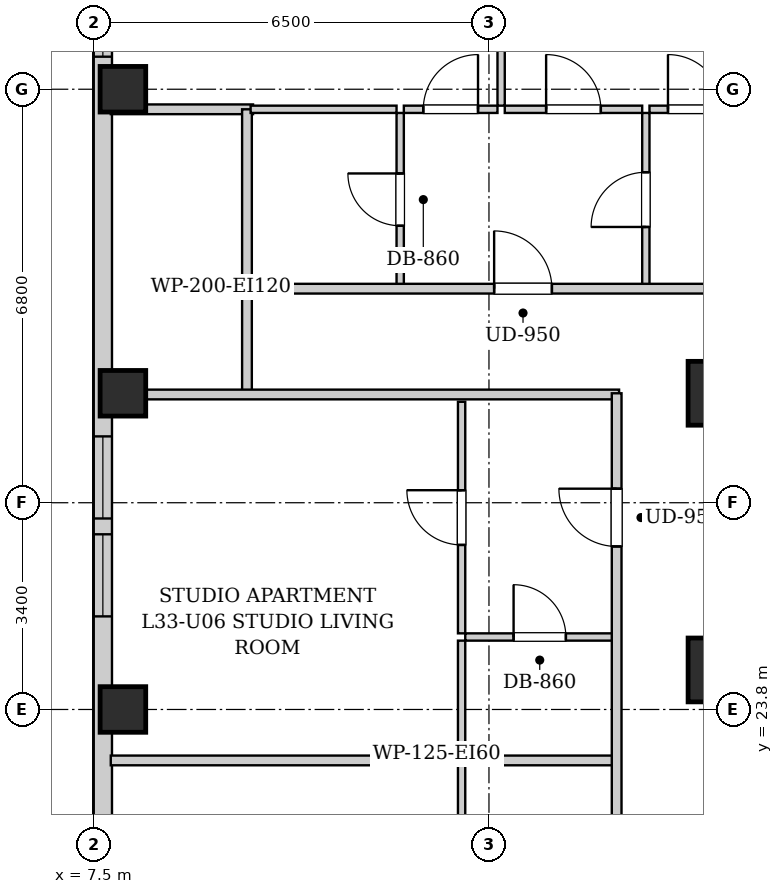
"""IFC4 building model, lengths in metres.
Left out: names, types, materials, properties, quantities, classifications, styles, units other than length and angle.
Written with IfcOpenShell. Run it as: python <this file> out.ifc"""

import sys

from ifc_helpers import new_model, si_unit, direction, frame, frame_2d, origin, origin_2d, place, context, subcontext, project, spatial, rectangle, extrude, element, fill, save


model = new_model("IFC4")
c1 = context("Model", 3, precision=1e-05, world=origin(), true_north=direction((0.0, 1.0)))
c2 = subcontext(c1, "Body", "Model", "MODEL_VIEW")
j1 = project(units=[si_unit("LENGTHUNIT", "METRE"), si_unit("PLANEANGLEUNIT", "RADIAN")], contexts=[c1])
p1 = place(None, origin())
s1 = spatial("IfcSite", under=j1, at=p1, CompositionType="ELEMENT")
p2 = place(p1, origin())
s2 = spatial("IfcBuilding", under=s1, at=p2, CompositionType="ELEMENT")
p3 = place(p2, frame((0.0, 0.0, 116.7)))
s3 = spatial("IfcBuildingStorey", under=s2, at=p3, CompositionType="ELEMENT", Elevation=116.7)
for number, where, z_axis, x_axis in (
    (1, (7.98, 23.8, 0.0), (0.0, 0.0, 1.0), (1.0, 0.0, 0.0)),
    (2, (7.98, 29.0, 0.0), (0.0, 0.0, 1.0), (1.0, 0.0, 0.0)),
    (3, (7.98, 34.0, 0.0), (0.0, 0.0, 1.0), (1.0, 0.0, 0.0)),
):
    element("IfcColumn", number, at=place(p3, frame(where, z_axis=z_axis, x_axis=x_axis)), inside=s3, PredefinedType="COLUMN", context=c2, shape_type="SweptSolid", body=[
        extrude(rectangle(XDim=0.75, YDim=0.75, at=origin_2d()), origin(), (0.0, 0.0, 1.0), 3.2),
    ])
for number, where, z_axis, x_axis in (
    (4, (17.8, 29.0, 0.0), (0.0, 0.0, 1.0), (1.0, 0.0, 0.0)),
    (5, (17.8, 24.45, 0.0), (0.0, 0.0, 1.0), (1.0, 0.0, 0.0)),
):
    element("IfcColumn", number, at=place(p3, frame(where, z_axis=z_axis, x_axis=x_axis)), inside=s3, PredefinedType="COLUMN", context=c2, shape_type="SweptSolid", body=[
        extrude(rectangle(XDim=1.05, YDim=1.05, at=origin_2d()), origin(), (0.0, 0.0, 1.0), 3.2),
    ])
p4 = place(p3, frame((7.65, 2.5, 0.0), z_axis=(0.0, 0.0, 1.0), x_axis=(0.0, 1.0, 0.0)))
e6 = element("IfcWall", 6, at=p4, inside=s3, PredefinedType="SOLIDWALL", context=c2, shape_type="SweptSolid", body=[
    extrude(rectangle(XDim=38.3, YDim=0.3, at=frame_2d((19.15, 0.0))), origin(), (0.0, 0.0, 1.0), 2.88),
])
p5 = place(p4, frame((3.38, 0.0, 0.55)))
e7 = element("IfcOpeningElement", 7, at=p5, cuts=e6, PredefinedType="OPENING", context=c2, shape_type="SweptSolid", body=[
    extrude(rectangle(XDim=1.35, YDim=1.2, at=frame_2d((0.675, 0.6))), frame((0.0, 0.16, 0.0), z_axis=(0.0, -1.0, 0.0), x_axis=(1.0, 0.0, 0.0)), (0.0, 0.0, 1.0), 0.32),
])
p6 = place(p4, frame((1.135, 0.0, 0.55)))
e8 = element("IfcOpeningElement", 8, at=p6, cuts=e6, PredefinedType="OPENING", context=c2, shape_type="SweptSolid", body=[
    extrude(rectangle(XDim=1.35, YDim=1.2, at=frame_2d((0.675, 0.6))), frame((0.0, 0.16, 0.0), z_axis=(0.0, -1.0, 0.0), x_axis=(1.0, 0.0, 0.0)), (0.0, 0.0, 1.0), 0.32),
])
p7 = place(p4, frame((33.946, 0.0, 0.55)))
e9 = element("IfcOpeningElement", 9, at=p7, cuts=e6, PredefinedType="OPENING", context=c2, shape_type="SweptSolid", body=[
    extrude(rectangle(XDim=1.35, YDim=1.2, at=frame_2d((0.675, 0.6))), frame((0.0, 0.16, 0.0), z_axis=(0.0, -1.0, 0.0), x_axis=(1.0, 0.0, 0.0)), (0.0, 0.0, 1.0), 0.32),
])
p8 = place(p4, frame((32.035, 0.0, 0.55)))
e10 = element("IfcOpeningElement", 10, at=p8, cuts=e6, PredefinedType="OPENING", context=c2, shape_type="SweptSolid", body=[
    extrude(rectangle(XDim=1.35, YDim=1.2, at=frame_2d((0.675, 0.6))), frame((0.0, 0.16, 0.0), z_axis=(0.0, -1.0, 0.0), x_axis=(1.0, 0.0, 0.0)), (0.0, 0.0, 1.0), 0.32),
])
p9 = place(p4, frame((15.65, 0.0, 0.55)))
e11 = element("IfcOpeningElement", 11, at=p9, cuts=e6, PredefinedType="OPENING", context=c2, shape_type="SweptSolid", body=[
    extrude(rectangle(XDim=1.35, YDim=1.2, at=frame_2d((0.675, 0.6))), frame((0.0, 0.16, 0.0), z_axis=(0.0, -1.0, 0.0), x_axis=(1.0, 0.0, 0.0)), (0.0, 0.0, 1.0), 0.32),
])
p10 = place(p4, frame((13.035, 0.0, 0.55)))
e12 = element("IfcOpeningElement", 12, at=p10, cuts=e6, PredefinedType="OPENING", context=c2, shape_type="SweptSolid", body=[
    extrude(rectangle(XDim=1.35, YDim=1.2, at=frame_2d((0.675, 0.6))), frame((0.0, 0.16, 0.0), z_axis=(0.0, -1.0, 0.0), x_axis=(1.0, 0.0, 0.0)), (0.0, 0.0, 1.0), 0.32),
])
p11 = place(p4, frame((22.831, 0.0, 0.55)))
e13 = element("IfcOpeningElement", 13, at=p11, cuts=e6, PredefinedType="OPENING", context=c2, shape_type="SweptSolid", body=[
    extrude(rectangle(XDim=1.35, YDim=1.2, at=frame_2d((0.675, 0.6))), frame((0.0, 0.16, 0.0), z_axis=(0.0, -1.0, 0.0), x_axis=(1.0, 0.0, 0.0)), (0.0, 0.0, 1.0), 0.32),
])
p12 = place(p4, frame((24.441, 0.0, 0.55)))
e14 = element("IfcOpeningElement", 14, at=p12, cuts=e6, PredefinedType="OPENING", context=c2, shape_type="SweptSolid", body=[
    extrude(rectangle(XDim=1.35, YDim=1.2, at=frame_2d((0.675, 0.6))), frame((0.0, 0.16, 0.0), z_axis=(0.0, -1.0, 0.0), x_axis=(1.0, 0.0, 0.0)), (0.0, 0.0, 1.0), 0.32),
])
p13 = place(p3, frame((10.02, 28.98, 0.0), z_axis=(0.0, 0.0, 1.0), x_axis=(0.0, 1.0, 0.0)))
e15 = element("IfcWall", 15, at=p13, inside=s3, PredefinedType="PARTITIONING", context=c2, shape_type="SweptSolid", body=[
    extrude(rectangle(XDim=1.74, YDim=0.16, at=frame_2d((0.87, 0.0))), origin(), (0.0, 0.0, 1.0), 2.88),
])
p14 = place(p3, frame((7.78, 28.98, 0.0), z_axis=(0.0, 0.0, 1.0), x_axis=(1.0, 0.0, 0.0)))
e16 = element("IfcWall", 16, at=p14, inside=s3, PredefinedType="PARTITIONING", context=c2, shape_type="SweptSolid", body=[
    extrude(rectangle(XDim=8.36, YDim=0.16, at=frame_2d((4.18, 0.0))), origin(), (0.0, 0.0, 1.0), 2.253),
])
p15 = place(p3, frame((7.78, 33.67, 0.0), z_axis=(0.0, 0.0, 1.0), x_axis=(1.0, 0.0, 0.0)))
e17 = element("IfcWall", 17, at=p15, inside=s3, PredefinedType="PARTITIONING", context=c2, shape_type="SweptSolid", body=[
    extrude(rectangle(XDim=2.34, YDim=0.16, at=frame_2d((1.17, 0.0))), origin(), (0.0, 0.0, 1.0), 2.88),
])
p16 = place(p3, frame((10.02, 30.76, 0.0), z_axis=(0.0, 0.0, 1.0), x_axis=(0.0, 1.0, 0.0)))
e18 = element("IfcWall", 18, at=p16, inside=s3, PredefinedType="PARTITIONING", context=c2, shape_type="SweptSolid", body=[
    extrude(rectangle(XDim=2.91, YDim=0.16, at=frame_2d((1.455, 0.0))), origin(), (0.0, 0.0, 1.0), 2.88),
])
p17 = place(p3, frame((12.54, 30.76, 0.0), z_axis=(0.0, 0.0, 1.0), x_axis=(0.0, 1.0, 0.0)))
e19 = element("IfcWall", 19, at=p17, inside=s3, PredefinedType="PARTITIONING", context=c2, shape_type="SweptSolid", body=[
    extrude(rectangle(XDim=2.85, YDim=0.12, at=frame_2d((1.425, 0.0))), origin(), (0.0, 0.0, 1.0), 2.88),
])
p18 = place(p17, frame((0.995, 0.0, 0.0)))
e20 = element("IfcOpeningElement", 20, at=p18, cuts=e19, PredefinedType="OPENING", context=c2, shape_type="SweptSolid", body=[
    extrude(rectangle(XDim=0.86, YDim=2.05, at=frame_2d((0.43, 1.025))), frame((0.0, 0.07, 0.0), z_axis=(0.0, -1.0, 0.0), x_axis=(1.0, 0.0, 0.0)), (0.0, 0.0, 1.0), 0.14),
])
p19 = place(p3, frame((10.08, 33.67, 0.0), z_axis=(0.0, 0.0, 1.0), x_axis=(1.0, 0.0, 0.0)))
e21 = element("IfcWall", 21, at=p19, inside=s3, PredefinedType="PARTITIONING", context=c2, shape_type="SweptSolid", body=[
    extrude(rectangle(XDim=2.4, YDim=0.12, at=frame_2d((1.2, 0.0))), origin(), (0.0, 0.0, 1.0), 2.88),
])
p20 = place(p3, frame((16.58, 30.76, 0.0), z_axis=(0.0, 0.0, 1.0), x_axis=(0.0, 1.0, 0.0)))
e22 = element("IfcWall", 22, at=p20, inside=s3, PredefinedType="PARTITIONING", context=c2, shape_type="SweptSolid", body=[
    extrude(rectangle(XDim=2.85, YDim=0.12, at=frame_2d((1.425, 0.0))), origin(), (0.0, 0.0, 1.0), 2.88),
])
p21 = place(p20, frame((0.975, 0.0, 0.0)))
e23 = element("IfcOpeningElement", 23, at=p21, cuts=e22, PredefinedType="OPENING", context=c2, shape_type="SweptSolid", body=[
    extrude(rectangle(XDim=0.9, YDim=2.05, at=frame_2d((0.45, 1.025))), frame((0.0, 0.07, 0.0), z_axis=(0.0, -1.0, 0.0), x_axis=(1.0, 0.0, 0.0)), (0.0, 0.0, 1.0), 0.14),
])
p22 = place(p3, frame((12.6, 33.67, 0.0), z_axis=(0.0, 0.0, 1.0), x_axis=(1.0, 0.0, 0.0)))
e24 = element("IfcWall", 24, at=p22, inside=s3, PredefinedType="PARTITIONING", context=c2, shape_type="SweptSolid", body=[
    extrude(rectangle(XDim=1.54, YDim=0.12, at=frame_2d((0.77, 0.0))), origin(), (0.0, 0.0, 1.0), 2.88),
])
p23 = place(p22, frame((0.32, 0.0, 0.0)))
e25 = element("IfcOpeningElement", 25, at=p23, cuts=e24, PredefinedType="OPENING", context=c2, shape_type="SweptSolid", body=[
    extrude(rectangle(XDim=0.9, YDim=2.05, at=frame_2d((0.45, 1.025))), frame((0.0, 0.07, 0.0), z_axis=(0.0, -1.0, 0.0), x_axis=(1.0, 0.0, 0.0)), (0.0, 0.0, 1.0), 0.14),
])
p24 = place(p3, frame((14.26, 33.67, 0.0), z_axis=(0.0, 0.0, 1.0), x_axis=(1.0, 0.0, 0.0)))
e26 = element("IfcWall", 26, at=p24, inside=s3, PredefinedType="PARTITIONING", context=c2, shape_type="SweptSolid", body=[
    extrude(rectangle(XDim=2.26, YDim=0.12, at=frame_2d((1.13, 0.0))), origin(), (0.0, 0.0, 1.0), 2.88),
])
p25 = place(p24, frame((0.68, 0.0, 0.0)))
e27 = element("IfcOpeningElement", 27, at=p25, cuts=e26, PredefinedType="OPENING", context=c2, shape_type="SweptSolid", body=[
    extrude(rectangle(XDim=0.9, YDim=2.05, at=frame_2d((0.45, 1.025))), frame((0.0, 0.07, 0.0), z_axis=(0.0, -1.0, 0.0), x_axis=(1.0, 0.0, 0.0)), (0.0, 0.0, 1.0), 0.14),
])
p26 = place(p3, frame((16.64, 33.67, 0.0), z_axis=(0.0, 0.0, 1.0), x_axis=(1.0, 0.0, 0.0)))
e28 = element("IfcWall", 28, at=p26, inside=s3, PredefinedType="PARTITIONING", context=c2, shape_type="SweptSolid", body=[
    extrude(rectangle(XDim=1.508, YDim=0.12, at=frame_2d((0.754, 0.0))), origin(), (0.0, 0.0, 1.0), 2.88),
])
p27 = place(p26, frame((0.304, 0.0, 0.0)))
e29 = element("IfcOpeningElement", 29, at=p27, cuts=e28, PredefinedType="OPENING", context=c2, shape_type="SweptSolid", body=[
    extrude(rectangle(XDim=0.9, YDim=2.05, at=frame_2d((0.45, 1.025))), frame((0.0, 0.07, 0.0), z_axis=(0.0, -1.0, 0.0), x_axis=(1.0, 0.0, 0.0)), (0.0, 0.0, 1.0), 0.14),
])
p28 = place(p3, frame((14.2, 33.73, 0.0), z_axis=(0.0, 0.0, 1.0), x_axis=(0.0, 1.0, 0.0)))
e30 = element("IfcWall", 30, at=p28, inside=s3, PredefinedType="PARTITIONING", context=c2, shape_type="SweptSolid", body=[
    extrude(rectangle(XDim=9.29, YDim=0.12, at=frame_2d((4.645, 0.0))), origin(), (0.0, 0.0, 1.0), 2.88),
])
p29 = place(p28, frame((4.18, 0.0, 0.0)))
e31 = element("IfcOpeningElement", 31, at=p29, cuts=e30, PredefinedType="OPENING", context=c2, shape_type="SweptSolid", body=[
    extrude(rectangle(XDim=0.9, YDim=2.05, at=frame_2d((0.45, 1.025))), frame((0.0, 0.07, 0.0), z_axis=(0.0, -1.0, 0.0), x_axis=(1.0, 0.0, 0.0)), (0.0, 0.0, 1.0), 0.14),
])
p30 = place(p3, frame((7.78, 22.962, 0.0), z_axis=(0.0, 0.0, 1.0), x_axis=(1.0, 0.0, 0.0)))
e32 = element("IfcWall", 32, at=p30, inside=s3, PredefinedType="PARTITIONING", context=c2, shape_type="SweptSolid", body=[
    extrude(rectangle(XDim=8.28, YDim=0.16, at=frame_2d((4.14, 0.0))), origin(), (0.0, 0.0, 1.0), 2.88),
])
p31 = place(p3, frame((13.55, 17.489, 0.0), z_axis=(0.0, 0.0, 1.0), x_axis=(0.0, 1.0, 0.0)))
e33 = element("IfcWall", 33, at=p31, inside=s3, PredefinedType="PARTITIONING", context=c2, shape_type="SweptSolid", body=[
    extrude(rectangle(XDim=5.433, YDim=0.12, at=frame_2d((2.717, 0.0))), origin(), (0.0, 0.0, 1.0), 2.88),
])
p32 = place(p31, frame((2.266, 0.0, 0.0)))
e34 = element("IfcOpeningElement", 34, at=p32, cuts=e33, PredefinedType="OPENING", context=c2, shape_type="SweptSolid", body=[
    extrude(rectangle(XDim=0.9, YDim=2.05, at=frame_2d((0.45, 1.025))), frame((0.0, 0.07, 0.0), z_axis=(0.0, -1.0, 0.0), x_axis=(1.0, 0.0, 0.0)), (0.0, 0.0, 1.0), 0.14),
])
p33 = place(p3, frame((13.61, 24.992, 0.0), z_axis=(0.0, 0.0, 1.0), x_axis=(1.0, 0.0, 0.0)))
e35 = element("IfcWall", 35, at=p33, inside=s3, PredefinedType="PARTITIONING", context=c2, shape_type="SweptSolid", body=[
    extrude(rectangle(XDim=2.45, YDim=0.12, at=frame_2d((1.225, 0.0))), origin(), (0.0, 0.0, 1.0), 2.88),
])
p34 = place(p33, frame((0.795, 0.0, 0.0)))
e36 = element("IfcOpeningElement", 36, at=p34, cuts=e35, PredefinedType="OPENING", context=c2, shape_type="SweptSolid", body=[
    extrude(rectangle(XDim=0.86, YDim=2.05, at=frame_2d((0.43, 1.025))), frame((0.0, 0.07, 0.0), z_axis=(0.0, -1.0, 0.0), x_axis=(1.0, 0.0, 0.0)), (0.0, 0.0, 1.0), 0.14),
])
p35 = place(p3, frame((13.55, 23.082, 0.0), z_axis=(0.0, 0.0, 1.0), x_axis=(0.0, 1.0, 0.0)))
e37 = element("IfcWall", 37, at=p35, inside=s3, PredefinedType="PARTITIONING", context=c2, shape_type="SweptSolid", body=[
    extrude(rectangle(XDim=1.85, YDim=0.12, at=frame_2d((0.925, 0.0))), origin(), (0.0, 0.0, 1.0), 2.88),
])
p36 = place(p3, frame((13.55, 25.052, 0.0), z_axis=(0.0, 0.0, 1.0), x_axis=(0.0, 1.0, 0.0)))
e38 = element("IfcWall", 38, at=p36, inside=s3, PredefinedType="PARTITIONING", context=c2, shape_type="SweptSolid", body=[
    extrude(rectangle(XDim=3.808, YDim=0.12, at=frame_2d((1.904, 0.0))), origin(), (0.0, 0.0, 1.0), 2.88),
])
p37 = place(p36, frame((1.454, 0.0, 0.0)))
e39 = element("IfcOpeningElement", 39, at=p37, cuts=e38, PredefinedType="OPENING", context=c2, shape_type="SweptSolid", body=[
    extrude(rectangle(XDim=0.9, YDim=2.05, at=frame_2d((0.45, 1.025))), frame((0.0, 0.07, 0.0), z_axis=(0.0, -1.0, 0.0), x_axis=(1.0, 0.0, 0.0)), (0.0, 0.0, 1.0), 0.14),
])
p38 = place(p3, frame((10.05, 30.72, 0.0), z_axis=(0.0, 0.0, 1.0), x_axis=(1.0, 0.0, 0.0)))
e40 = element("IfcWall", 40, at=p38, inside=s3, PredefinedType="PARTITIONING", context=c2, shape_type="SweptSolid", body=[
    extrude(rectangle(XDim=30.8, YDim=0.16, at=frame_2d((15.4, 0.0))), origin(), (0.0, 0.0, 1.0), 2.88),
])
p39 = place(p38, frame((4.035, 0.0, 0.0)))
e41 = element("IfcOpeningElement", 41, at=p39, cuts=e40, PredefinedType="OPENING", context=c2, shape_type="SweptSolid", body=[
    extrude(rectangle(XDim=0.95, YDim=2.1, at=frame_2d((0.475, 1.05))), frame((0.0, 0.09, 0.0), z_axis=(0.0, -1.0, 0.0), x_axis=(1.0, 0.0, 0.0)), (0.0, 0.0, 1.0), 0.18),
])
p40 = place(p38, frame((25.11, 0.0, 0.0)))
e42 = element("IfcOpeningElement", 42, at=p40, cuts=e40, PredefinedType="OPENING", context=c2, shape_type="SweptSolid", body=[
    extrude(rectangle(XDim=0.95, YDim=2.1, at=frame_2d((0.475, 1.05))), frame((0.0, 0.09, 0.0), z_axis=(0.0, -1.0, 0.0), x_axis=(1.0, 0.0, 0.0)), (0.0, 0.0, 1.0), 0.18),
])
p41 = place(p3, frame((16.1, 15.07, 0.0), z_axis=(0.0, 0.0, 1.0), x_axis=(0.0, 1.0, 0.0)))
e43 = element("IfcWall", 43, at=p41, inside=s3, PredefinedType="PARTITIONING", context=c2, shape_type="SweptSolid", body=[
    extrude(rectangle(XDim=13.93, YDim=0.16, at=frame_2d((6.965, 0.0))), origin(), (0.0, 0.0, 1.0), 2.88),
])
p42 = place(p41, frame((4.661, 0.0, 0.0)))
e44 = element("IfcOpeningElement", 44, at=p42, cuts=e43, PredefinedType="OPENING", context=c2, shape_type="SweptSolid", body=[
    extrude(rectangle(XDim=0.95, YDim=2.1, at=frame_2d((0.475, 1.05))), frame((0.0, 0.09, 0.0), z_axis=(0.0, -1.0, 0.0), x_axis=(1.0, 0.0, 0.0)), (0.0, 0.0, 1.0), 0.18),
])
p43 = place(p41, frame((11.411, 0.0, 0.0)))
e45 = element("IfcOpeningElement", 45, at=p43, cuts=e43, PredefinedType="OPENING", context=c2, shape_type="SweptSolid", body=[
    extrude(rectangle(XDim=0.95, YDim=2.1, at=frame_2d((0.475, 1.05))), frame((0.0, 0.09, 0.0), z_axis=(0.0, -1.0, 0.0), x_axis=(1.0, 0.0, 0.0)), (0.0, 0.0, 1.0), 0.18),
])
p44 = place(p18, origin())
e46 = element("IfcDoor", 46, at=p44, inside=s3, OperationType="SINGLE_SWING_RIGHT", PredefinedType="DOOR", context=c2, shape_type="SweptSolid", body=[
    extrude(rectangle(XDim=0.86, YDim=2.05, at=frame_2d((0.43, 1.025))), frame((0.0, 0.025, 0.0), z_axis=(0.0, -1.0, 0.0), x_axis=(1.0, 0.0, 0.0)), (0.0, 0.0, 1.0), 0.05),
])
fill(e20, e46)
p45 = place(p21, origin())
e47 = element("IfcDoor", 47, at=p45, inside=s3, OperationType="SINGLE_SWING_LEFT", PredefinedType="DOOR", context=c2, shape_type="SweptSolid", body=[
    extrude(rectangle(XDim=0.9, YDim=2.05, at=frame_2d((0.45, 1.025))), frame((0.0, 0.025, 0.0), z_axis=(0.0, -1.0, 0.0), x_axis=(1.0, 0.0, 0.0)), (0.0, 0.0, 1.0), 0.05),
])
fill(e23, e47)
p46 = place(p23, origin())
e48 = element("IfcDoor", 48, at=p46, inside=s3, OperationType="SINGLE_SWING_RIGHT", PredefinedType="DOOR", context=c2, shape_type="SweptSolid", body=[
    extrude(rectangle(XDim=0.9, YDim=2.05, at=frame_2d((0.45, 1.025))), frame((0.0, 0.025, 0.0), z_axis=(0.0, -1.0, 0.0), x_axis=(1.0, 0.0, 0.0)), (0.0, 0.0, 1.0), 0.05),
])
fill(e25, e48)
p47 = place(p25, origin())
e49 = element("IfcDoor", 49, at=p47, inside=s3, OperationType="SINGLE_SWING_LEFT", PredefinedType="DOOR", context=c2, shape_type="SweptSolid", body=[
    extrude(rectangle(XDim=0.9, YDim=2.05, at=frame_2d((0.45, 1.025))), frame((0.0, 0.025, 0.0), z_axis=(0.0, -1.0, 0.0), x_axis=(1.0, 0.0, 0.0)), (0.0, 0.0, 1.0), 0.05),
])
fill(e27, e49)
p48 = place(p27, origin())
e50 = element("IfcDoor", 50, at=p48, inside=s3, OperationType="SINGLE_SWING_LEFT", PredefinedType="DOOR", context=c2, shape_type="SweptSolid", body=[
    extrude(rectangle(XDim=0.9, YDim=2.05, at=frame_2d((0.45, 1.025))), frame((0.0, 0.025, 0.0), z_axis=(0.0, -1.0, 0.0), x_axis=(1.0, 0.0, 0.0)), (0.0, 0.0, 1.0), 0.05),
])
fill(e29, e50)
p49 = place(p34, origin())
e51 = element("IfcDoor", 51, at=p49, inside=s3, OperationType="SINGLE_SWING_LEFT", PredefinedType="DOOR", context=c2, shape_type="SweptSolid", body=[
    extrude(rectangle(XDim=0.86, YDim=2.05, at=frame_2d((0.43, 1.025))), frame((0.0, 0.025, 0.0), z_axis=(0.0, -1.0, 0.0), x_axis=(1.0, 0.0, 0.0)), (0.0, 0.0, 1.0), 0.05),
])
fill(e36, e51)
p50 = place(p37, origin())
e52 = element("IfcDoor", 52, at=p50, inside=s3, OperationType="SINGLE_SWING_RIGHT", PredefinedType="DOOR", context=c2, shape_type="SweptSolid", body=[
    extrude(rectangle(XDim=0.9, YDim=2.05, at=frame_2d((0.45, 1.025))), frame((0.0, 0.025, 0.0), z_axis=(0.0, -1.0, 0.0), x_axis=(1.0, 0.0, 0.0)), (0.0, 0.0, 1.0), 0.05),
])
fill(e39, e52)
p51 = place(p39, origin())
e53 = element("IfcDoor", 53, at=p51, inside=s3, OperationType="SINGLE_SWING_LEFT", PredefinedType="DOOR", context=c2, shape_type="SweptSolid", body=[
    extrude(rectangle(XDim=0.95, YDim=2.1, at=frame_2d((0.475, 1.05))), frame((0.0, 0.025, 0.0), z_axis=(0.0, -1.0, 0.0), x_axis=(1.0, 0.0, 0.0)), (0.0, 0.0, 1.0), 0.05),
])
fill(e41, e53)
p52 = place(p43, origin())
e54 = element("IfcDoor", 54, at=p52, inside=s3, OperationType="SINGLE_SWING_RIGHT", PredefinedType="DOOR", context=c2, shape_type="SweptSolid", body=[
    extrude(rectangle(XDim=0.95, YDim=2.1, at=frame_2d((0.475, 1.05))), frame((0.0, 0.025, 0.0), z_axis=(0.0, -1.0, 0.0), x_axis=(1.0, 0.0, 0.0)), (0.0, 0.0, 1.0), 0.05),
])
fill(e45, e54)
p53 = place(p8, origin())
e55 = element("IfcWindow", 55, at=p53, inside=s3, PartitioningType="SINGLE_PANEL", PredefinedType="WINDOW", context=c2, shape_type="SweptSolid", body=[
    extrude(rectangle(XDim=1.35, YDim=1.2, at=frame_2d((0.675, 0.6))), frame((0.0, 0.03, 0.0), z_axis=(0.0, -1.0, 0.0), x_axis=(1.0, 0.0, 0.0)), (0.0, 0.0, 1.0), 0.06),
])
fill(e10, e55)
p54 = place(p11, origin())
e56 = element("IfcWindow", 56, at=p54, inside=s3, PartitioningType="SINGLE_PANEL", PredefinedType="WINDOW", context=c2, shape_type="SweptSolid", body=[
    extrude(rectangle(XDim=1.35, YDim=1.2, at=frame_2d((0.675, 0.6))), frame((0.0, 0.03, 0.0), z_axis=(0.0, -1.0, 0.0), x_axis=(1.0, 0.0, 0.0)), (0.0, 0.0, 1.0), 0.06),
])
fill(e13, e56)
p55 = place(p12, origin())
e57 = element("IfcWindow", 57, at=p55, inside=s3, PartitioningType="SINGLE_PANEL", PredefinedType="WINDOW", context=c2, shape_type="SweptSolid", body=[
    extrude(rectangle(XDim=1.35, YDim=1.2, at=frame_2d((0.675, 0.6))), frame((0.0, 0.03, 0.0), z_axis=(0.0, -1.0, 0.0), x_axis=(1.0, 0.0, 0.0)), (0.0, 0.0, 1.0), 0.06),
])
fill(e14, e57)
save(model, sys.argv[1])
